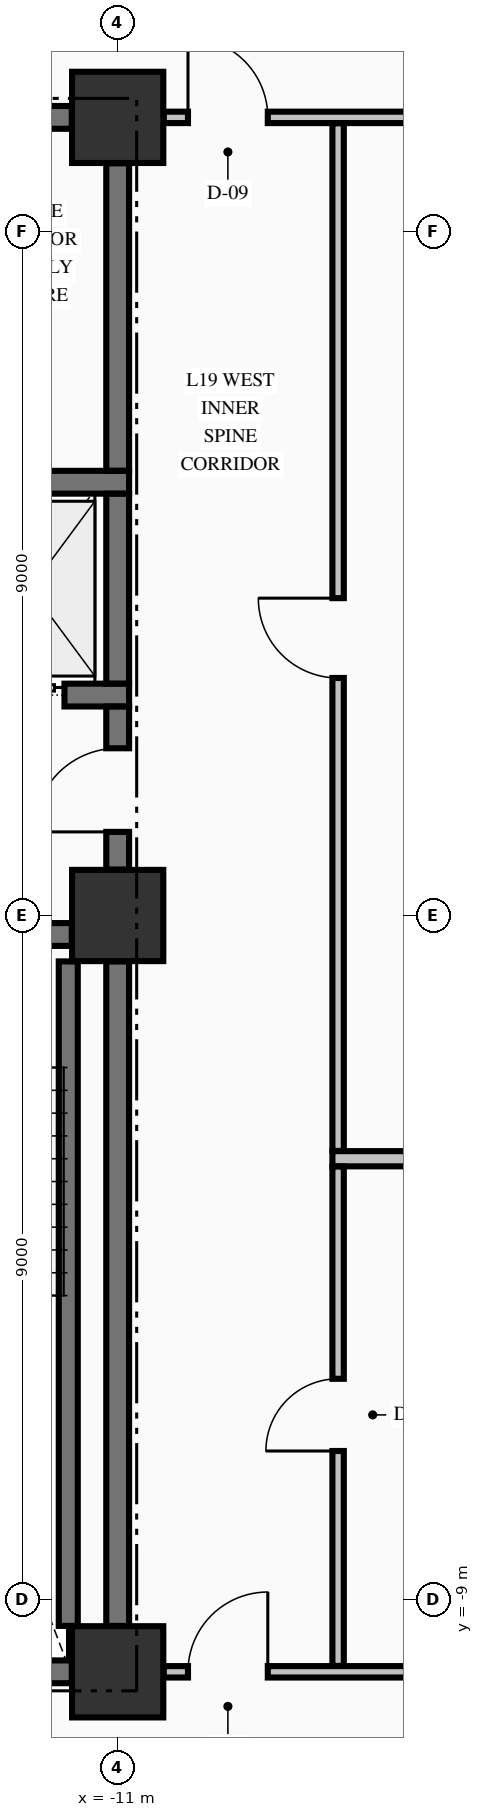
"""IFC4 building model, lengths in metres.
Left out: names, types, materials, properties, quantities, classifications, styles, units other than length and angle.
Written with IfcOpenShell. Run it as: python <this file> out.ifc"""

import sys

from ifc_helpers import new_model, si_unit, direction, frame, frame_2d, origin, origin_2d, place, context, subcontext, project, spatial, rectangle, extrude, element, fill, save


model = new_model("IFC4")
c1 = context("Model", 3, precision=1e-05, world=origin(), true_north=direction((0.0, 1.0)))
c2 = subcontext(c1, "Body", "Model", "MODEL_VIEW")
j1 = project(units=[si_unit("LENGTHUNIT", "METRE"), si_unit("PLANEANGLEUNIT", "RADIAN")], contexts=[c1])
p1 = place(None, origin())
s1 = spatial("IfcSite", under=j1, at=p1, CompositionType="ELEMENT")
p2 = place(p1, origin())
s2 = spatial("IfcBuilding", under=s1, at=p2, CompositionType="ELEMENT")
p3 = place(p2, frame((0.0, 0.0, 78.61)))
s3 = spatial("IfcBuildingStorey", under=s2, at=p3, CompositionType="ELEMENT", Elevation=78.61)
for number, where, z_axis, x_axis in (
    (1, (-11.0, -9.95, -0.25), (0.0, 0.0, 1.0), (1.0, 0.0, 0.0)),
    (2, (-11.0, 0.0, -0.25), (0.0, 0.0, 1.0), (1.0, 0.0, 0.0)),
    (3, (-11.0, 10.5, -0.25), (0.0, 0.0, 1.0), (1.0, 0.0, 0.0)),
):
    element("IfcColumn", number, at=place(p3, frame(where, z_axis=z_axis, x_axis=x_axis)), inside=s3, PredefinedType="COLUMN", context=c2, shape_type="SweptSolid", body=[
        extrude(rectangle(XDim=1.2, YDim=1.2, at=origin_2d()), origin(), (0.0, 0.0, 1.0), 3.395),
    ])
p4 = place(p3, frame((-14.7, -9.95, 0.0), z_axis=(0.0, 0.0, 1.0), x_axis=(1.0, 0.0, 0.0)))
e4 = element("IfcWall", 4, at=p4, inside=s3, PredefinedType="SHEAR", context=c2, shape_type="SweptSolid", body=[
    extrude(rectangle(XDim=3.096, YDim=0.3, at=frame_2d((1.548, 0.0))), origin(), (0.0, 0.0, 1.0), 3.145),
])
p5 = place(p3, frame((-19.396, -0.25, 0.0), z_axis=(0.0, 0.0, 1.0), x_axis=(1.0, 0.0, 0.0)))
e5 = element("IfcWall", 5, at=p5, inside=s3, PredefinedType="SHEAR", context=c2, shape_type="SweptSolid", body=[
    extrude(rectangle(XDim=7.792, YDim=0.3, at=frame_2d((3.896, 0.0))), origin(), (0.0, 0.0, 1.0), 3.145),
])
p6 = place(p5, frame((5.696, 0.0, 0.0)))
e6 = element("IfcOpeningElement", 6, at=p6, cuts=e5, PredefinedType="OPENING", context=c2, shape_type="SweptSolid", body=[
    extrude(rectangle(XDim=1.1, YDim=2.15, at=frame_2d((0.55, 1.075))), frame((0.0, 0.16, 0.0), z_axis=(0.0, -1.0, 0.0), x_axis=(1.0, 0.0, 0.0)), (0.0, 0.0, 1.0), 0.32),
])
p7 = place(p3, frame((-14.875, 2.9, 0.0), z_axis=(0.0, 0.0, 1.0), x_axis=(1.0, 0.0, 0.0)))
e7 = element("IfcWall", 7, at=p7, inside=s3, PredefinedType="SHEAR", context=c2, shape_type="SweptSolid", body=[
    extrude(rectangle(XDim=4.025, YDim=0.3, at=frame_2d((2.012, 0.0))), origin(), (0.0, 0.0, 1.0), 3.145),
])
p8 = place(p7, frame((2.075, 0.0, 0.0)))
e8 = element("IfcOpeningElement", 8, at=p8, cuts=e7, PredefinedType="OPENING", context=c2, shape_type="SweptSolid", body=[
    extrude(rectangle(XDim=1.1, YDim=2.2, at=frame_2d((0.55, 1.1))), frame((0.0, 0.16, 0.0), z_axis=(0.0, -1.0, 0.0), x_axis=(1.0, 0.0, 0.0)), (0.0, 0.0, 1.0), 0.32),
])
p9 = place(p3, frame((-14.875, 5.7, 0.0), z_axis=(0.0, 0.0, 1.0), x_axis=(1.0, 0.0, 0.0)))
e9 = element("IfcWall", 9, at=p9, inside=s3, PredefinedType="SHEAR", context=c2, shape_type="SweptSolid", body=[
    extrude(rectangle(XDim=4.025, YDim=0.3, at=frame_2d((2.012, 0.0))), origin(), (0.0, 0.0, 1.0), 3.145),
])
p10 = place(p3, frame((-14.7, 10.5, 0.0), z_axis=(0.0, 0.0, 1.0), x_axis=(1.0, 0.0, 0.0)))
e10 = element("IfcWall", 10, at=p10, inside=s3, PredefinedType="SHEAR", context=c2, shape_type="SweptSolid", body=[
    extrude(rectangle(XDim=3.096, YDim=0.3, at=frame_2d((1.548, 0.0))), origin(), (0.0, 0.0, 1.0), 3.145),
])
p11 = place(p10, frame((0.245, 0.0, 0.0)))
e11 = element("IfcOpeningElement", 11, at=p11, cuts=e10, PredefinedType="OPENING", context=c2, shape_type="SweptSolid", body=[
    extrude(rectangle(XDim=0.95, YDim=2.15, at=frame_2d((0.475, 1.075))), frame((0.0, 0.16, 0.0), z_axis=(0.0, -1.0, 0.0), x_axis=(1.0, 0.0, 0.0)), (0.0, 0.0, 1.0), 0.32),
])
p12 = place(p3, frame((-10.394, -9.95, 0.0), z_axis=(0.0, 0.0, 1.0), x_axis=(1.0, 0.0, 0.0)))
e12 = element("IfcWall", 12, at=p12, inside=s3, PredefinedType="PARTITIONING", context=c2, shape_type="SweptSolid", body=[
    extrude(rectangle(XDim=20.788, YDim=0.15, at=frame_2d((10.394, 0.0))), origin(), (0.0, 0.0, 1.0), 3.145),
])
p13 = place(p12, frame((0.319, 0.0, 0.0)))
e13 = element("IfcOpeningElement", 13, at=p13, cuts=e12, PredefinedType="OPENING", context=c2, shape_type="SweptSolid", body=[
    extrude(rectangle(XDim=1.05, YDim=2.15, at=frame_2d((0.525, 1.075))), frame((0.0, 0.085, 0.0), z_axis=(0.0, -1.0, 0.0), x_axis=(1.0, 0.0, 0.0)), (0.0, 0.0, 1.0), 0.17),
])
p14 = place(p12, frame((19.419, 0.0, 0.0)))
e14 = element("IfcOpeningElement", 14, at=p14, cuts=e12, PredefinedType="OPENING", context=c2, shape_type="SweptSolid", body=[
    extrude(rectangle(XDim=1.05, YDim=2.15, at=frame_2d((0.525, 1.075))), frame((0.0, 0.085, 0.0), z_axis=(0.0, -1.0, 0.0), x_axis=(1.0, 0.0, 0.0)), (0.0, 0.0, 1.0), 0.17),
])
p15 = place(p12, frame((11.569, 0.0, 0.0)))
e15 = element("IfcOpeningElement", 15, at=p15, cuts=e12, PredefinedType="OPENING", context=c2, shape_type="SweptSolid", body=[
    extrude(rectangle(XDim=0.95, YDim=2.15, at=frame_2d((0.475, 1.075))), frame((0.0, 0.085, 0.0), z_axis=(0.0, -1.0, 0.0), x_axis=(1.0, 0.0, 0.0)), (0.0, 0.0, 1.0), 0.17),
])
p16 = place(p3, frame((-8.175, -3.2, 0.0), z_axis=(0.0, 0.0, 1.0), x_axis=(1.0, 0.0, 0.0)))
e16 = element("IfcWall", 16, at=p16, inside=s3, PredefinedType="PARTITIONING", context=c2, shape_type="SweptSolid", body=[
    extrude(rectangle(XDim=6.475, YDim=0.2, at=frame_2d((3.238, 0.0))), origin(), (0.0, 0.0, 1.0), 3.145),
])
p17 = place(p3, frame((-10.394, 10.5, 0.0), z_axis=(0.0, 0.0, 1.0), x_axis=(1.0, 0.0, 0.0)))
e17 = element("IfcWall", 17, at=p17, inside=s3, PredefinedType="PARTITIONING", context=c2, shape_type="SweptSolid", body=[
    extrude(rectangle(XDim=20.788, YDim=0.15, at=frame_2d((10.394, 0.0))), origin(), (0.0, 0.0, 1.0), 3.145),
])
p18 = place(p17, frame((0.319, 0.0, 0.0)))
e18 = element("IfcOpeningElement", 18, at=p18, cuts=e17, PredefinedType="OPENING", context=c2, shape_type="SweptSolid", body=[
    extrude(rectangle(XDim=1.05, YDim=2.15, at=frame_2d((0.525, 1.075))), frame((0.0, 0.085, 0.0), z_axis=(0.0, -1.0, 0.0), x_axis=(1.0, 0.0, 0.0)), (0.0, 0.0, 1.0), 0.17),
])
p19 = place(p17, frame((19.419, 0.0, 0.0)))
e19 = element("IfcOpeningElement", 19, at=p19, cuts=e17, PredefinedType="OPENING", context=c2, shape_type="SweptSolid", body=[
    extrude(rectangle(XDim=1.05, YDim=2.15, at=frame_2d((0.525, 1.075))), frame((0.0, 0.085, 0.0), z_axis=(0.0, -1.0, 0.0), x_axis=(1.0, 0.0, 0.0)), (0.0, 0.0, 1.0), 0.17),
])
p20 = place(p3, frame((-11.65, -9.346, 0.0), z_axis=(0.0, 0.0, 1.0), x_axis=(0.0, 1.0, 0.0)))
e20 = element("IfcWall", 20, at=p20, inside=s3, PredefinedType="SOLIDWALL", context=c2, shape_type="SweptSolid", body=[
    extrude(rectangle(XDim=8.742, YDim=0.25, at=frame_2d((4.371, 0.0))), origin(), (0.0, 0.0, 1.0), 3.145),
])
p21 = place(p3, frame((-11.0, -9.346, 0.0), z_axis=(0.0, 0.0, 1.0), x_axis=(0.0, 1.0, 0.0)))
e21 = element("IfcWall", 21, at=p21, inside=s3, PredefinedType="SHEAR", context=c2, shape_type="SweptSolid", body=[
    extrude(rectangle(XDim=8.742, YDim=0.3, at=frame_2d((4.371, 0.0))), origin(), (0.0, 0.0, 1.0), 3.145),
])
p22 = place(p3, frame((-11.0, 0.604, 0.0), z_axis=(0.0, 0.0, 1.0), x_axis=(0.0, 1.0, 0.0)))
e22 = element("IfcWall", 22, at=p22, inside=s3, PredefinedType="SHEAR", context=c2, shape_type="SweptSolid", body=[
    extrude(rectangle(XDim=2.144, YDim=0.3, at=frame_2d((1.072, 0.0))), origin(), (0.0, 0.0, 1.0), 3.145),
])
p23 = place(p22, frame((0.496, 0.0, 0.0)))
e23 = element("IfcOpeningElement", 23, at=p23, cuts=e22, PredefinedType="OPENING", context=c2, shape_type="SweptSolid", body=[
    extrude(rectangle(XDim=1.1, YDim=2.15, at=frame_2d((0.55, 1.075))), frame((0.0, 0.16, 0.0), z_axis=(0.0, -1.0, 0.0), x_axis=(1.0, 0.0, 0.0)), (0.0, 0.0, 1.0), 0.32),
])
p24 = place(p3, frame((-11.0, 3.052, 0.0), z_axis=(0.0, 0.0, 1.0), x_axis=(0.0, 1.0, 0.0)))
e24 = element("IfcWall", 24, at=p24, inside=s3, PredefinedType="SHEAR", context=c2, shape_type="SweptSolid", body=[
    extrude(rectangle(XDim=2.496, YDim=0.3, at=frame_2d((1.248, 0.0))), origin(), (0.0, 0.0, 1.0), 3.145),
])
p25 = place(p3, frame((-11.0, 5.852, 0.0), z_axis=(0.0, 0.0, 1.0), x_axis=(0.0, 1.0, 0.0)))
e25 = element("IfcWall", 25, at=p25, inside=s3, PredefinedType="SHEAR", context=c2, shape_type="SweptSolid", body=[
    extrude(rectangle(XDim=4.044, YDim=0.3, at=frame_2d((2.022, 0.0))), origin(), (0.0, 0.0, 1.0), 3.145),
])
p26 = place(p3, frame((-8.1, -9.872, 0.0), z_axis=(0.0, 0.0, 1.0), x_axis=(0.0, 1.0, 0.0)))
e26 = element("IfcWall", 26, at=p26, inside=s3, PredefinedType="PARTITIONING", context=c2, shape_type="SweptSolid", body=[
    extrude(rectangle(XDim=6.569, YDim=0.15, at=frame_2d((3.285, 0.0))), origin(), (0.0, 0.0, 1.0), 3.145),
])
p27 = place(p26, frame((2.827, 0.0, 0.0)))
e27 = element("IfcOpeningElement", 27, at=p27, cuts=e26, PredefinedType="OPENING", context=c2, shape_type="SweptSolid", body=[
    extrude(rectangle(XDim=0.95, YDim=2.15, at=frame_2d((0.475, 1.075))), frame((0.0, 0.085, 0.0), z_axis=(0.0, -1.0, 0.0), x_axis=(1.0, 0.0, 0.0)), (0.0, 0.0, 1.0), 0.17),
])
p28 = place(p3, frame((-8.1, -3.097, 0.0), z_axis=(0.0, 0.0, 1.0), x_axis=(0.0, 1.0, 0.0)))
e28 = element("IfcWall", 28, at=p28, inside=s3, PredefinedType="PARTITIONING", context=c2, shape_type="SweptSolid", body=[
    extrude(rectangle(XDim=13.519, YDim=0.15, at=frame_2d((6.76, 0.0))), origin(), (0.0, 0.0, 1.0), 3.145),
])
p29 = place(p28, frame((6.222, 0.0, 0.0)))
e29 = element("IfcOpeningElement", 29, at=p29, cuts=e28, PredefinedType="OPENING", context=c2, shape_type="SweptSolid", body=[
    extrude(rectangle(XDim=1.05, YDim=2.15, at=frame_2d((0.525, 1.075))), frame((0.0, 0.085, 0.0), z_axis=(0.0, -1.0, 0.0), x_axis=(1.0, 0.0, 0.0)), (0.0, 0.0, 1.0), 0.17),
])
p30 = place(p23, origin())
e30 = element("IfcDoor", 30, at=p30, inside=s3, OperationType="SINGLE_SWING_LEFT", PredefinedType="DOOR", context=c2, shape_type="SweptSolid", body=[
    extrude(rectangle(XDim=1.1, YDim=2.15, at=frame_2d((0.55, 1.075))), frame((0.0, 0.025, 0.0), z_axis=(0.0, -1.0, 0.0), x_axis=(1.0, 0.0, 0.0)), (0.0, 0.0, 1.0), 0.05),
])
fill(e23, e30)
p31 = place(p8, origin())
e31 = element("IfcDoor", 31, at=p31, inside=s3, OperationType="SLIDING_TO_LEFT", PredefinedType="DOOR", context=c2, shape_type="SweptSolid", body=[
    extrude(rectangle(XDim=1.1, YDim=2.2, at=frame_2d((0.55, 1.1))), frame((0.0, 0.025, 0.0), z_axis=(0.0, -1.0, 0.0), x_axis=(1.0, 0.0, 0.0)), (0.0, 0.0, 1.0), 0.05),
])
fill(e8, e31)
p32 = place(p18, origin())
e32 = element("IfcDoor", 32, at=p32, inside=s3, OperationType="SINGLE_SWING_LEFT", PredefinedType="DOOR", context=c2, shape_type="SweptSolid", body=[
    extrude(rectangle(XDim=1.05, YDim=2.15, at=frame_2d((0.525, 1.075))), frame((0.0, 0.025, 0.0), z_axis=(0.0, -1.0, 0.0), x_axis=(1.0, 0.0, 0.0)), (0.0, 0.0, 1.0), 0.05),
])
fill(e18, e32)
p33 = place(p13, origin())
e33 = element("IfcDoor", 33, at=p33, inside=s3, OperationType="SINGLE_SWING_RIGHT", PredefinedType="DOOR", context=c2, shape_type="SweptSolid", body=[
    extrude(rectangle(XDim=1.05, YDim=2.15, at=frame_2d((0.525, 1.075))), frame((0.0, 0.025, 0.0), z_axis=(0.0, -1.0, 0.0), x_axis=(1.0, 0.0, 0.0)), (0.0, 0.0, 1.0), 0.05),
])
fill(e13, e33)
p34 = place(p29, origin())
e34 = element("IfcDoor", 34, at=p34, inside=s3, OperationType="SINGLE_SWING_RIGHT", PredefinedType="DOOR", context=c2, shape_type="SweptSolid", body=[
    extrude(rectangle(XDim=1.05, YDim=2.15, at=frame_2d((0.525, 1.075))), frame((0.0, 0.025, 0.0), z_axis=(0.0, -1.0, 0.0), x_axis=(1.0, 0.0, 0.0)), (0.0, 0.0, 1.0), 0.05),
])
fill(e29, e34)
p35 = place(p27, origin())
e35 = element("IfcDoor", 35, at=p35, inside=s3, OperationType="SINGLE_SWING_LEFT", PredefinedType="DOOR", context=c2, shape_type="SweptSolid", body=[
    extrude(rectangle(XDim=0.95, YDim=2.15, at=frame_2d((0.475, 1.075))), frame((0.0, 0.025, 0.0), z_axis=(0.0, -1.0, 0.0), x_axis=(1.0, 0.0, 0.0)), (0.0, 0.0, 1.0), 0.05),
])
fill(e27, e35)
save(model, sys.argv[1])
